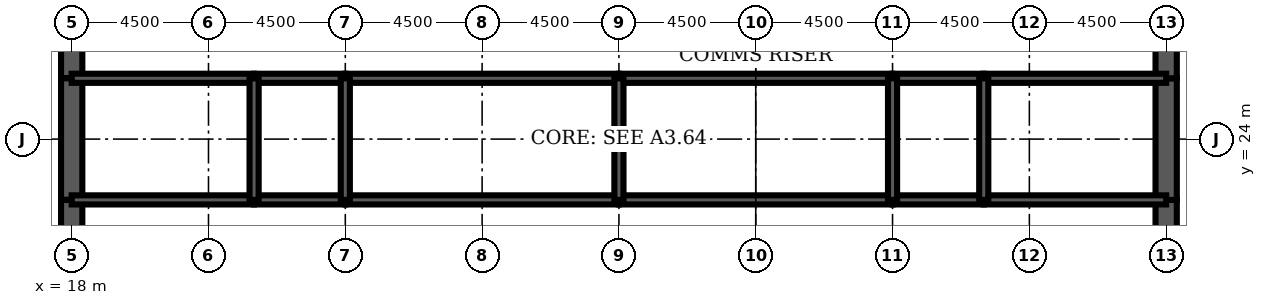
"""IFC4 building model, lengths in metres.
Left out: names, types, materials, properties, quantities, classifications, styles, units other than length and angle.
Written with IfcOpenShell. Run it as: python <this file> out.ifc"""

import sys

from ifc_helpers import new_model, si_unit, direction, frame, frame_2d, origin, place, context, subcontext, project, spatial, rectangle, extrude, element, fill, save


model = new_model("IFC4")
c1 = context("Model", 3, precision=1e-05, world=origin(), true_north=direction((0.0, 1.0)))
c2 = subcontext(c1, "Body", "Model", "MODEL_VIEW")
j1 = project(units=[si_unit("LENGTHUNIT", "METRE"), si_unit("PLANEANGLEUNIT", "RADIAN")], contexts=[c1])
p1 = place(None, origin())
s1 = spatial("IfcSite", under=j1, at=p1, CompositionType="ELEMENT")
p2 = place(p1, origin())
s2 = spatial("IfcBuilding", under=s1, at=p2, CompositionType="ELEMENT")
p3 = place(p2, frame((0.0, 0.0, 275.3)))
s3 = spatial("IfcBuildingStorey", under=s2, at=p3, CompositionType="ELEMENT", Elevation=275.3)
p4 = place(p3, frame((18.0, 28.8, 0.0), z_axis=(0.0, 0.0, 1.0), x_axis=(0.0, -1.0, 0.0)))
e1 = element("IfcWall", 1, at=p4, inside=s3, PredefinedType="SHEAR", context=c2, shape_type="SweptSolid", body=[
    extrude(rectangle(XDim=2.8, YDim=0.7, at=frame_2d((1.4, 0.0))), origin(), (0.0, 0.0, 1.0), 4.2),
])
p5 = place(p4, frame((0.4, 0.0, 0.0)))
e2 = element("IfcOpeningElement", 2, at=p5, cuts=e1, PredefinedType="OPENING", context=c2, shape_type="SweptSolid", body=[
    extrude(rectangle(XDim=1.8, YDim=2.1, at=frame_2d((0.9, 1.05))), frame((0.0, 0.36, 0.0), z_axis=(0.0, -1.0, 0.0), x_axis=(1.0, 0.0, 0.0)), (0.0, 0.0, 1.0), 0.72),
])
p6 = place(p3, frame((18.0, 26.0, 0.0), z_axis=(0.0, 0.0, 1.0), x_axis=(0.0, -1.0, 0.0)))
e3 = element("IfcWall", 3, at=p6, inside=s3, PredefinedType="SHEAR", context=c2, shape_type="SweptSolid", body=[
    extrude(rectangle(XDim=4.0, YDim=0.7, at=frame_2d((2.0, 0.0))), origin(), (0.0, 0.0, 1.0), 4.2),
])
p7 = place(p3, frame((18.0, 22.0, 0.0), z_axis=(0.0, 0.0, 1.0), x_axis=(0.0, -1.0, 0.0)))
e4 = element("IfcWall", 4, at=p7, inside=s3, PredefinedType="SHEAR", context=c2, shape_type="SweptSolid", body=[
    extrude(rectangle(XDim=2.8, YDim=0.7, at=frame_2d((1.4, 0.0))), origin(), (0.0, 0.0, 1.0), 4.2),
])
p8 = place(p7, frame((0.6, 0.0, 0.0)))
e5 = element("IfcOpeningElement", 5, at=p8, cuts=e4, PredefinedType="OPENING", context=c2, shape_type="SweptSolid", body=[
    extrude(rectangle(XDim=1.8, YDim=2.1, at=frame_2d((0.9, 1.05))), frame((0.0, 0.36, 0.0), z_axis=(0.0, -1.0, 0.0), x_axis=(1.0, 0.0, 0.0)), (0.0, 0.0, 1.0), 0.72),
])
p9 = place(p3, frame((54.0, 19.2, 0.0), z_axis=(0.0, 0.0, 1.0), x_axis=(0.0, 1.0, 0.0)))
e6 = element("IfcWall", 6, at=p9, inside=s3, PredefinedType="SHEAR", context=c2, shape_type="SweptSolid", body=[
    extrude(rectangle(XDim=2.8, YDim=0.7, at=frame_2d((1.4, 0.0))), origin(), (0.0, 0.0, 1.0), 4.2),
])
p10 = place(p9, frame((0.4, 0.0, 0.0)))
e7 = element("IfcOpeningElement", 7, at=p10, cuts=e6, PredefinedType="OPENING", context=c2, shape_type="SweptSolid", body=[
    extrude(rectangle(XDim=1.8, YDim=2.1, at=frame_2d((0.9, 1.05))), frame((0.0, 0.36, 0.0), z_axis=(0.0, -1.0, 0.0), x_axis=(1.0, 0.0, 0.0)), (0.0, 0.0, 1.0), 0.72),
])
p11 = place(p3, frame((54.0, 22.0, 0.0), z_axis=(0.0, 0.0, 1.0), x_axis=(0.0, 1.0, 0.0)))
e8 = element("IfcWall", 8, at=p11, inside=s3, PredefinedType="SHEAR", context=c2, shape_type="SweptSolid", body=[
    extrude(rectangle(XDim=4.0, YDim=0.7, at=frame_2d((2.0, 0.0))), origin(), (0.0, 0.0, 1.0), 4.2),
])
p12 = place(p3, frame((54.0, 26.0, 0.0), z_axis=(0.0, 0.0, 1.0), x_axis=(0.0, 1.0, 0.0)))
e9 = element("IfcWall", 9, at=p12, inside=s3, PredefinedType="SHEAR", context=c2, shape_type="SweptSolid", body=[
    extrude(rectangle(XDim=2.8, YDim=0.7, at=frame_2d((1.4, 0.0))), origin(), (0.0, 0.0, 1.0), 4.2),
])
p13 = place(p12, frame((0.6, 0.0, 0.0)))
e10 = element("IfcOpeningElement", 10, at=p13, cuts=e9, PredefinedType="OPENING", context=c2, shape_type="SweptSolid", body=[
    extrude(rectangle(XDim=1.8, YDim=2.1, at=frame_2d((0.9, 1.05))), frame((0.0, 0.36, 0.0), z_axis=(0.0, -1.0, 0.0), x_axis=(1.0, 0.0, 0.0)), (0.0, 0.0, 1.0), 0.72),
])
p14 = place(p3, frame((18.0, 22.0, 0.0), z_axis=(0.0, 0.0, 1.0), x_axis=(1.0, 0.0, 0.0)))
e11 = element("IfcWall", 11, at=p14, inside=s3, PredefinedType="SOLIDWALL", context=c2, shape_type="SweptSolid", body=[
    extrude(rectangle(XDim=6.0, YDim=0.3, at=frame_2d((3.0, 0.0))), origin(), (0.0, 0.0, 1.0), 4.2),
])
p15 = place(p14, frame((4.4, 0.0, 0.0)))
e12 = element("IfcOpeningElement", 12, at=p15, cuts=e11, PredefinedType="OPENING", context=c2, shape_type="SweptSolid", body=[
    extrude(rectangle(XDim=1.0, YDim=2.1, at=frame_2d((0.5, 1.05))), frame((0.0, 0.16, 0.0), z_axis=(0.0, -1.0, 0.0), x_axis=(1.0, 0.0, 0.0)), (0.0, 0.0, 1.0), 0.32),
])
p16 = place(p14, frame((0.9, 0.0, 0.0)))
e13 = element("IfcOpeningElement", 13, at=p16, cuts=e11, PredefinedType="OPENING", context=c2, shape_type="SweptSolid", body=[
    extrude(rectangle(XDim=1.0, YDim=2.1, at=frame_2d((0.5, 1.05))), frame((0.0, 0.16, 0.0), z_axis=(0.0, -1.0, 0.0), x_axis=(1.0, 0.0, 0.0)), (0.0, 0.0, 1.0), 0.32),
])
p17 = place(p3, frame((24.0, 22.0, 0.0), z_axis=(0.0, 0.0, 1.0), x_axis=(1.0, 0.0, 0.0)))
e14 = element("IfcWall", 14, at=p17, inside=s3, PredefinedType="SOLIDWALL", context=c2, shape_type="SweptSolid", body=[
    extrude(rectangle(XDim=3.0, YDim=0.3, at=frame_2d((1.5, 0.0))), origin(), (0.0, 0.0, 1.0), 4.2),
])
p18 = place(p17, frame((1.0, 0.0, 0.0)))
e15 = element("IfcOpeningElement", 15, at=p18, cuts=e14, PredefinedType="OPENING", context=c2, shape_type="SweptSolid", body=[
    extrude(rectangle(XDim=1.0, YDim=2.1, at=frame_2d((0.5, 1.05))), frame((0.0, 0.16, 0.0), z_axis=(0.0, -1.0, 0.0), x_axis=(1.0, 0.0, 0.0)), (0.0, 0.0, 1.0), 0.32),
])
p19 = place(p3, frame((27.0, 22.0, 0.0), z_axis=(0.0, 0.0, 1.0), x_axis=(1.0, 0.0, 0.0)))
e16 = element("IfcWall", 16, at=p19, inside=s3, PredefinedType="SOLIDWALL", context=c2, shape_type="SweptSolid", body=[
    extrude(rectangle(XDim=9.0, YDim=0.3, at=frame_2d((4.5, 0.0))), origin(), (0.0, 0.0, 1.0), 4.2),
])
p20 = place(p19, frame((4.0, 0.0, 0.0)))
e17 = element("IfcOpeningElement", 17, at=p20, cuts=e16, PredefinedType="OPENING", context=c2, shape_type="SweptSolid", body=[
    extrude(rectangle(XDim=1.0, YDim=2.1, at=frame_2d((0.5, 1.05))), frame((0.0, 0.16, 0.0), z_axis=(0.0, -1.0, 0.0), x_axis=(1.0, 0.0, 0.0)), (0.0, 0.0, 1.0), 0.32),
])
p21 = place(p3, frame((36.0, 22.0, 0.0), z_axis=(0.0, 0.0, 1.0), x_axis=(1.0, 0.0, 0.0)))
e18 = element("IfcWall", 18, at=p21, inside=s3, PredefinedType="SOLIDWALL", context=c2, shape_type="SweptSolid", body=[
    extrude(rectangle(XDim=9.0, YDim=0.3, at=frame_2d((4.5, 0.0))), origin(), (0.0, 0.0, 1.0), 4.2),
])
p22 = place(p21, frame((4.0, 0.0, 0.0)))
e19 = element("IfcOpeningElement", 19, at=p22, cuts=e18, PredefinedType="OPENING", context=c2, shape_type="SweptSolid", body=[
    extrude(rectangle(XDim=1.0, YDim=2.1, at=frame_2d((0.5, 1.05))), frame((0.0, 0.16, 0.0), z_axis=(0.0, -1.0, 0.0), x_axis=(1.0, 0.0, 0.0)), (0.0, 0.0, 1.0), 0.32),
])
p23 = place(p3, frame((45.0, 22.0, 0.0), z_axis=(0.0, 0.0, 1.0), x_axis=(1.0, 0.0, 0.0)))
e20 = element("IfcWall", 20, at=p23, inside=s3, PredefinedType="SOLIDWALL", context=c2, shape_type="SweptSolid", body=[
    extrude(rectangle(XDim=3.0, YDim=0.3, at=frame_2d((1.5, 0.0))), origin(), (0.0, 0.0, 1.0), 4.2),
])
p24 = place(p23, frame((1.0, 0.0, 0.0)))
e21 = element("IfcOpeningElement", 21, at=p24, cuts=e20, PredefinedType="OPENING", context=c2, shape_type="SweptSolid", body=[
    extrude(rectangle(XDim=1.0, YDim=2.1, at=frame_2d((0.5, 1.05))), frame((0.0, 0.16, 0.0), z_axis=(0.0, -1.0, 0.0), x_axis=(1.0, 0.0, 0.0)), (0.0, 0.0, 1.0), 0.32),
])
p25 = place(p3, frame((48.0, 22.0, 0.0), z_axis=(0.0, 0.0, 1.0), x_axis=(1.0, 0.0, 0.0)))
e22 = element("IfcWall", 22, at=p25, inside=s3, PredefinedType="SOLIDWALL", context=c2, shape_type="SweptSolid", body=[
    extrude(rectangle(XDim=6.0, YDim=0.3, at=frame_2d((3.0, 0.0))), origin(), (0.0, 0.0, 1.0), 4.2),
])
p26 = place(p25, frame((2.0, 0.0, 0.0)))
e23 = element("IfcOpeningElement", 23, at=p26, cuts=e22, PredefinedType="OPENING", context=c2, shape_type="SweptSolid", body=[
    extrude(rectangle(XDim=1.0, YDim=2.1, at=frame_2d((0.5, 1.05))), frame((0.0, 0.16, 0.0), z_axis=(0.0, -1.0, 0.0), x_axis=(1.0, 0.0, 0.0)), (0.0, 0.0, 1.0), 0.32),
])
p27 = place(p25, frame((4.1, 0.0, 0.0)))
e24 = element("IfcOpeningElement", 24, at=p27, cuts=e22, PredefinedType="OPENING", context=c2, shape_type="SweptSolid", body=[
    extrude(rectangle(XDim=1.0, YDim=2.1, at=frame_2d((0.5, 1.05))), frame((0.0, 0.16, 0.0), z_axis=(0.0, -1.0, 0.0), x_axis=(1.0, 0.0, 0.0)), (0.0, 0.0, 1.0), 0.32),
])
p28 = place(p3, frame((18.0, 26.0, 0.0), z_axis=(0.0, 0.0, 1.0), x_axis=(1.0, 0.0, 0.0)))
e25 = element("IfcWall", 25, at=p28, inside=s3, PredefinedType="SOLIDWALL", context=c2, shape_type="SweptSolid", body=[
    extrude(rectangle(XDim=6.0, YDim=0.3, at=frame_2d((3.0, 0.0))), origin(), (0.0, 0.0, 1.0), 4.2),
])
p29 = place(p3, frame((24.0, 26.0, 0.0), z_axis=(0.0, 0.0, 1.0), x_axis=(1.0, 0.0, 0.0)))
e26 = element("IfcWall", 26, at=p29, inside=s3, PredefinedType="SOLIDWALL", context=c2, shape_type="SweptSolid", body=[
    extrude(rectangle(XDim=3.0, YDim=0.3, at=frame_2d((1.5, 0.0))), origin(), (0.0, 0.0, 1.0), 4.2),
])
for number, where, z_axis, x_axis in (
    (27, (27.0, 26.0, 0.0), (0.0, 0.0, 1.0), (1.0, 0.0, 0.0)),
    (28, (36.0, 26.0, 0.0), (0.0, 0.0, 1.0), (1.0, 0.0, 0.0)),
):
    element("IfcWall", number, at=place(p3, frame(where, z_axis=z_axis, x_axis=x_axis)), inside=s3, PredefinedType="SOLIDWALL", context=c2, shape_type="SweptSolid", body=[
        extrude(rectangle(XDim=9.0, YDim=0.3, at=frame_2d((4.5, 0.0))), origin(), (0.0, 0.0, 1.0), 4.2),
    ])
p30 = place(p3, frame((45.0, 26.0, 0.0), z_axis=(0.0, 0.0, 1.0), x_axis=(1.0, 0.0, 0.0)))
e29 = element("IfcWall", 29, at=p30, inside=s3, PredefinedType="SOLIDWALL", context=c2, shape_type="SweptSolid", body=[
    extrude(rectangle(XDim=3.0, YDim=0.3, at=frame_2d((1.5, 0.0))), origin(), (0.0, 0.0, 1.0), 4.2),
])
p31 = place(p3, frame((48.0, 26.0, 0.0), z_axis=(0.0, 0.0, 1.0), x_axis=(1.0, 0.0, 0.0)))
e30 = element("IfcWall", 30, at=p31, inside=s3, PredefinedType="SOLIDWALL", context=c2, shape_type="SweptSolid", body=[
    extrude(rectangle(XDim=6.0, YDim=0.3, at=frame_2d((3.0, 0.0))), origin(), (0.0, 0.0, 1.0), 4.2),
])
for number, where, z_axis, x_axis in (
    (31, (24.0, 22.0, 0.0), (0.0, 0.0, 1.0), (0.0, 1.0, 0.0)),
    (32, (27.0, 22.0, 0.0), (0.0, 0.0, 1.0), (0.0, 1.0, 0.0)),
    (33, (36.0, 22.0, 0.0), (0.0, 0.0, 1.0), (0.0, 1.0, 0.0)),
    (34, (45.0, 22.0, 0.0), (0.0, 0.0, 1.0), (0.0, 1.0, 0.0)),
    (35, (48.0, 22.0, 0.0), (0.0, 0.0, 1.0), (0.0, 1.0, 0.0)),
):
    element("IfcWall", number, at=place(p3, frame(where, z_axis=z_axis, x_axis=x_axis)), inside=s3, PredefinedType="SOLIDWALL", context=c2, shape_type="SweptSolid", body=[
        extrude(rectangle(XDim=4.0, YDim=0.3, at=frame_2d((2.0, 0.0))), origin(), (0.0, 0.0, 1.0), 4.2),
    ])
p32 = place(p3, frame((42.0, 22.15, 0.0), z_axis=(0.0, 0.0, 1.0), x_axis=(0.0, 1.0, 0.0)))
e36 = element("IfcWall", 36, at=p32, inside=s3, PredefinedType="PARTITIONING", context=c2, shape_type="SweptSolid", body=[
    extrude(rectangle(XDim=3.7, YDim=0.15, at=frame_2d((1.85, 0.0))), origin(), (0.0, 0.0, 1.0), 3.0),
])
p33 = place(p32, frame((2.2, 0.0, 0.0)))
e37 = element("IfcOpeningElement", 37, at=p33, cuts=e36, PredefinedType="OPENING", context=c2, shape_type="SweptSolid", body=[
    extrude(rectangle(XDim=1.0, YDim=2.1, at=frame_2d((0.5, 1.05))), frame((0.0, 0.085, 0.0), z_axis=(0.0, -1.0, 0.0), x_axis=(1.0, 0.0, 0.0)), (0.0, 0.0, 1.0), 0.17),
])
for number, where, z_axis, x_axis in (
    (38, (20.525, 22.15, 0.0), (0.0, 0.0, 1.0), (0.0, 1.0, 0.0)),
    (39, (51.475, 22.15, 0.0), (0.0, 0.0, 1.0), (0.0, 1.0, 0.0)),
):
    element("IfcWall", number, at=place(p3, frame(where, z_axis=z_axis, x_axis=x_axis)), inside=s3, PredefinedType="PARTITIONING", context=c2, shape_type="SweptSolid", body=[
        extrude(rectangle(XDim=3.7, YDim=0.15, at=frame_2d((1.85, 0.0))), origin(), (0.0, 0.0, 1.0), 3.0),
    ])
p34 = place(p33, origin())
e40 = element("IfcDoor", 40, at=p34, inside=s3, OperationType="SINGLE_SWING_RIGHT", PredefinedType="DOOR", context=c2, shape_type="SweptSolid", body=[
    extrude(rectangle(XDim=1.0, YDim=2.1, at=frame_2d((0.5, 1.05))), frame((0.0, 0.025, 0.0), z_axis=(0.0, -1.0, 0.0), x_axis=(1.0, 0.0, 0.0)), (0.0, 0.0, 1.0), 0.05),
])
fill(e37, e40)
p35 = place(p8, origin())
e41 = element("IfcDoor", 41, at=p35, inside=s3, OperationType="SINGLE_SWING_LEFT", PredefinedType="DOOR", context=c2, shape_type="SweptSolid", body=[
    extrude(rectangle(XDim=1.8, YDim=2.1, at=frame_2d((0.9, 1.05))), frame((0.0, 0.35, 0.0), z_axis=(0.0, -1.0, 0.0), x_axis=(1.0, 0.0, 0.0)), (0.0, 0.0, 1.0), 0.699),
])
fill(e5, e41)
p36 = place(p5, origin())
e42 = element("IfcDoor", 42, at=p36, inside=s3, OperationType="SINGLE_SWING_LEFT", PredefinedType="DOOR", context=c2, shape_type="SweptSolid", body=[
    extrude(rectangle(XDim=1.8, YDim=2.1, at=frame_2d((0.9, 1.05))), frame((0.0, 0.35, 0.0), z_axis=(0.0, -1.0, 0.0), x_axis=(1.0, 0.0, 0.0)), (0.0, 0.0, 1.0), 0.699),
])
fill(e2, e42)
p37 = place(p10, origin())
e43 = element("IfcDoor", 43, at=p37, inside=s3, OperationType="SINGLE_SWING_LEFT", PredefinedType="DOOR", context=c2, shape_type="SweptSolid", body=[
    extrude(rectangle(XDim=1.8, YDim=2.1, at=frame_2d((0.9, 1.05))), frame((0.0, 0.35, 0.0), z_axis=(0.0, -1.0, 0.0), x_axis=(1.0, 0.0, 0.0)), (0.0, 0.0, 1.0), 0.699),
])
fill(e7, e43)
p38 = place(p13, origin())
e44 = element("IfcDoor", 44, at=p38, inside=s3, OperationType="SINGLE_SWING_LEFT", PredefinedType="DOOR", context=c2, shape_type="SweptSolid", body=[
    extrude(rectangle(XDim=1.8, YDim=2.1, at=frame_2d((0.9, 1.05))), frame((0.0, 0.35, 0.0), z_axis=(0.0, -1.0, 0.0), x_axis=(1.0, 0.0, 0.0)), (0.0, 0.0, 1.0), 0.699),
])
fill(e10, e44)
p39 = place(p15, origin())
e45 = element("IfcDoor", 45, at=p39, inside=s3, OperationType="SINGLE_SWING_RIGHT", PredefinedType="DOOR", context=c2, shape_type="SweptSolid", body=[
    extrude(rectangle(XDim=1.0, YDim=2.1, at=frame_2d((0.5, 1.05))), frame((0.0, 0.025, 0.0), z_axis=(0.0, -1.0, 0.0), x_axis=(1.0, 0.0, 0.0)), (0.0, 0.0, 1.0), 0.05),
])
fill(e12, e45)
p40 = place(p18, origin())
e46 = element("IfcDoor", 46, at=p40, inside=s3, OperationType="SINGLE_SWING_LEFT", PredefinedType="DOOR", context=c2, shape_type="SweptSolid", body=[
    extrude(rectangle(XDim=1.0, YDim=2.1, at=frame_2d((0.5, 1.05))), frame((0.0, 0.025, 0.0), z_axis=(0.0, -1.0, 0.0), x_axis=(1.0, 0.0, 0.0)), (0.0, 0.0, 1.0), 0.05),
])
fill(e15, e46)
p41 = place(p20, origin())
e47 = element("IfcDoor", 47, at=p41, inside=s3, OperationType="SINGLE_SWING_LEFT", PredefinedType="DOOR", context=c2, shape_type="SweptSolid", body=[
    extrude(rectangle(XDim=1.0, YDim=2.1, at=frame_2d((0.5, 1.05))), frame((0.0, 0.025, 0.0), z_axis=(0.0, -1.0, 0.0), x_axis=(1.0, 0.0, 0.0)), (0.0, 0.0, 1.0), 0.05),
])
fill(e17, e47)
p42 = place(p22, origin())
e48 = element("IfcDoor", 48, at=p42, inside=s3, OperationType="SINGLE_SWING_LEFT", PredefinedType="DOOR", context=c2, shape_type="SweptSolid", body=[
    extrude(rectangle(XDim=1.0, YDim=2.1, at=frame_2d((0.5, 1.05))), frame((0.0, 0.025, 0.0), z_axis=(0.0, -1.0, 0.0), x_axis=(1.0, 0.0, 0.0)), (0.0, 0.0, 1.0), 0.05),
])
fill(e19, e48)
p43 = place(p24, origin())
e49 = element("IfcDoor", 49, at=p43, inside=s3, OperationType="SINGLE_SWING_LEFT", PredefinedType="DOOR", context=c2, shape_type="SweptSolid", body=[
    extrude(rectangle(XDim=1.0, YDim=2.1, at=frame_2d((0.5, 1.05))), frame((0.0, 0.025, 0.0), z_axis=(0.0, -1.0, 0.0), x_axis=(1.0, 0.0, 0.0)), (0.0, 0.0, 1.0), 0.05),
])
fill(e21, e49)
p44 = place(p26, origin())
e50 = element("IfcDoor", 50, at=p44, inside=s3, OperationType="SINGLE_SWING_LEFT", PredefinedType="DOOR", context=c2, shape_type="SweptSolid", body=[
    extrude(rectangle(XDim=1.0, YDim=2.1, at=frame_2d((0.5, 1.05))), frame((0.0, 0.025, 0.0), z_axis=(0.0, -1.0, 0.0), x_axis=(1.0, 0.0, 0.0)), (0.0, 0.0, 1.0), 0.05),
])
fill(e23, e50)
p45 = place(p16, origin())
e51 = element("IfcDoor", 51, at=p45, inside=s3, OperationType="SINGLE_SWING_LEFT", PredefinedType="DOOR", context=c2, shape_type="SweptSolid", body=[
    extrude(rectangle(XDim=1.0, YDim=2.1, at=frame_2d((0.5, 1.05))), frame((0.0, 0.025, 0.0), z_axis=(0.0, -1.0, 0.0), x_axis=(1.0, 0.0, 0.0)), (0.0, 0.0, 1.0), 0.05),
])
fill(e13, e51)
p46 = place(p27, origin())
e52 = element("IfcDoor", 52, at=p46, inside=s3, OperationType="SINGLE_SWING_RIGHT", PredefinedType="DOOR", context=c2, shape_type="SweptSolid", body=[
    extrude(rectangle(XDim=1.0, YDim=2.1, at=frame_2d((0.5, 1.05))), frame((0.0, 0.025, 0.0), z_axis=(0.0, -1.0, 0.0), x_axis=(1.0, 0.0, 0.0)), (0.0, 0.0, 1.0), 0.05),
])
fill(e24, e52)
save(model, sys.argv[1])
